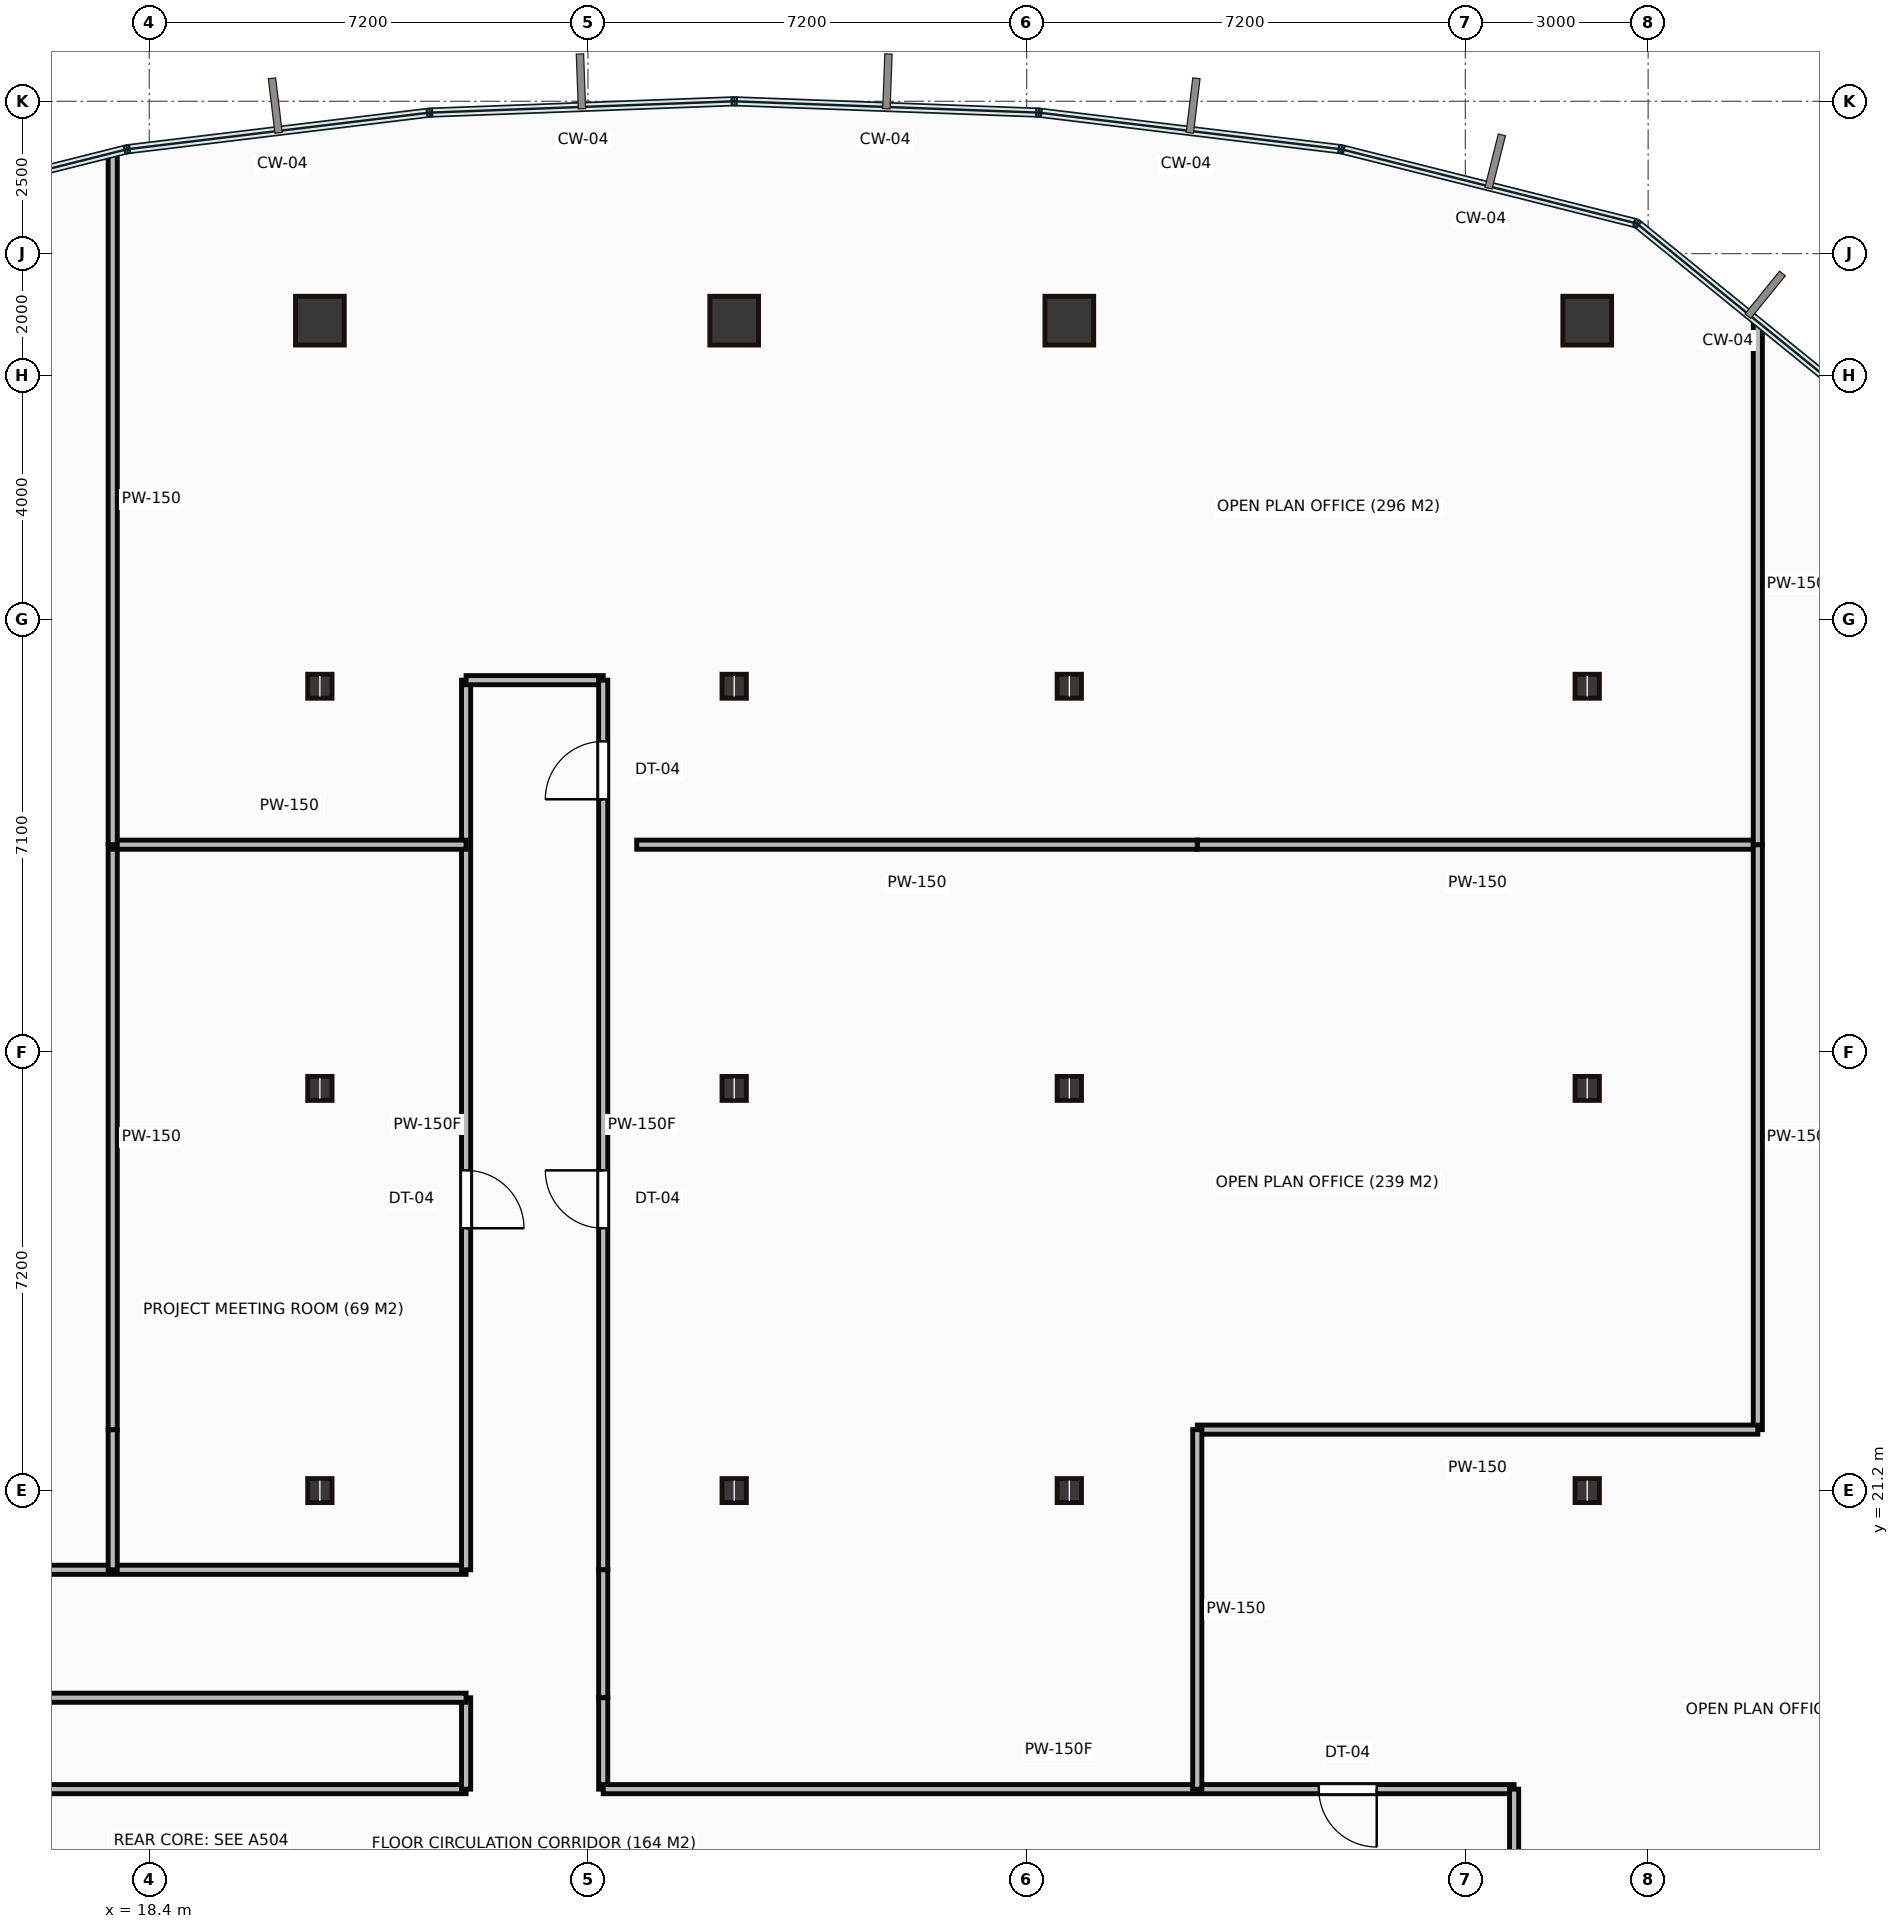
"""IFC4 building model, lengths in metres.
Left out: names, types, materials, properties, quantities, classifications, styles, units other than length and angle.
Written with IfcOpenShell. Run it as: python <this file> out.ifc"""

import sys

from ifc_helpers import new_model, si_unit, direction, frame, frame_2d, origin, origin_2d, place, context, subcontext, project, spatial, rectangle, hollow_rectangle, i_section, extrude, source, transform, mapped, element, fill, save


model = new_model("IFC4")
c1 = context("Model", 3, precision=1e-05, world=origin(), true_north=direction((0.0, 1.0)))
c2 = subcontext(c1, "Body", "Model", "MODEL_VIEW")
j1 = project(units=[si_unit("LENGTHUNIT", "METRE"), si_unit("PLANEANGLEUNIT", "RADIAN")], contexts=[c1])
p1 = place(None, origin())
s1 = spatial("IfcSite", under=j1, at=p1, CompositionType="ELEMENT")
p2 = place(p1, origin())
s2 = spatial("IfcBuilding", under=s1, at=p2, CompositionType="ELEMENT")
p3 = place(p2, frame((0.0, 0.0, 95.95)))
s3 = spatial("IfcBuildingStorey", under=s2, at=p3, CompositionType="ELEMENT", Elevation=95.95)
m1 = source(origin(), c2, "Body", "SweptSolid", [
    extrude(i_section(OverallWidth=0.399, OverallDepth=0.393, WebThickness=0.023, FlangeThickness=0.037, at=origin_2d()), origin(), (0.0, 0.0, 1.0), 3.65),
])
for number, where, z_axis, x_axis in (
    (1, (21.2, 21.2, 0.0), (0.0, 0.0, 1.0), (1.0, 0.0, 0.0)),
    (2, (21.2, 27.8, 0.0), (0.0, 0.0, 1.0), (1.0, 0.0, 0.0)),
    (3, (21.2, 34.4, 0.0), (0.0, 0.0, 1.0), (1.0, 0.0, 0.0)),
):
    element("IfcColumn", number, at=place(p3, frame(where, z_axis=z_axis, x_axis=x_axis)), inside=s3, PredefinedType="COLUMN", context=c2, shape_type="MappedRepresentation", body=[
        mapped(m1, transform((0.0, 0.0, 0.0))),
    ])
m2 = source(origin(), c2, "Body", "SweptSolid", [
    extrude(hollow_rectangle(XDim=0.8, YDim=0.8, WallThickness=0.04, at=origin_2d()), origin(), (0.0, 0.0, 1.0), 3.65),
])
p4 = place(p3, frame((21.2, 40.4, 0.0), z_axis=(0.0, 0.0, 1.0), x_axis=(1.0, 0.0, 0.0)))
e4 = element("IfcColumn", 4, at=p4, inside=s3, PredefinedType="COLUMN", context=c2, shape_type="MappedRepresentation", body=[
    mapped(m2, transform((0.0, 0.0, 0.0))),
])
for number, where, z_axis, x_axis in (
    (5, (28.0, 21.2, 0.0), (0.0, 0.0, 1.0), (1.0, 0.0, 0.0)),
    (6, (28.0, 27.8, 0.0), (0.0, 0.0, 1.0), (1.0, 0.0, 0.0)),
    (7, (28.0, 34.4, 0.0), (0.0, 0.0, 1.0), (1.0, 0.0, 0.0)),
):
    element("IfcColumn", number, at=place(p3, frame(where, z_axis=z_axis, x_axis=x_axis)), inside=s3, PredefinedType="COLUMN", context=c2, shape_type="MappedRepresentation", body=[
        mapped(m1, transform((0.0, 0.0, 0.0))),
    ])
p5 = place(p3, frame((28.0, 40.4, 0.0), z_axis=(0.0, 0.0, 1.0), x_axis=(1.0, 0.0, 0.0)))
e8 = element("IfcColumn", 8, at=p5, inside=s3, PredefinedType="COLUMN", context=c2, shape_type="MappedRepresentation", body=[
    mapped(m2, transform((0.0, 0.0, 0.0))),
])
for number, where, z_axis, x_axis in (
    (9, (33.5, 21.2, 0.0), (0.0, 0.0, 1.0), (1.0, 0.0, 0.0)),
    (10, (33.5, 27.8, 0.0), (0.0, 0.0, 1.0), (1.0, 0.0, 0.0)),
    (11, (33.5, 34.4, 0.0), (0.0, 0.0, 1.0), (1.0, 0.0, 0.0)),
):
    element("IfcColumn", number, at=place(p3, frame(where, z_axis=z_axis, x_axis=x_axis)), inside=s3, PredefinedType="COLUMN", context=c2, shape_type="MappedRepresentation", body=[
        mapped(m1, transform((0.0, 0.0, 0.0))),
    ])
p6 = place(p3, frame((33.5, 40.4, 0.0), z_axis=(0.0, 0.0, 1.0), x_axis=(1.0, 0.0, 0.0)))
e12 = element("IfcColumn", 12, at=p6, inside=s3, PredefinedType="COLUMN", context=c2, shape_type="MappedRepresentation", body=[
    mapped(m2, transform((0.0, 0.0, 0.0))),
])
for number, where, z_axis, x_axis in (
    (13, (42.0, 21.2, 0.0), (0.0, 0.0, 1.0), (1.0, 0.0, 0.0)),
    (14, (42.0, 27.8, 0.0), (0.0, 0.0, 1.0), (1.0, 0.0, 0.0)),
    (15, (42.0, 34.4, 0.0), (0.0, 0.0, 1.0), (1.0, 0.0, 0.0)),
):
    element("IfcColumn", number, at=place(p3, frame(where, z_axis=z_axis, x_axis=x_axis)), inside=s3, PredefinedType="COLUMN", context=c2, shape_type="MappedRepresentation", body=[
        mapped(m1, transform((0.0, 0.0, 0.0))),
    ])
p7 = place(p3, frame((42.0, 40.4, 0.0), z_axis=(0.0, 0.0, 1.0), x_axis=(1.0, 0.0, 0.0)))
e16 = element("IfcColumn", 16, at=p7, inside=s3, PredefinedType="COLUMN", context=c2, shape_type="MappedRepresentation", body=[
    mapped(m2, transform((0.0, 0.0, 0.0))),
])
m3 = source(origin(), c2, "Body", "SweptSolid", [
    extrude(rectangle(XDim=19.0, YDim=0.15, at=frame_2d((9.5, 0.0))), origin(), (0.0, 0.0, 1.0), 3.4),
])
p8 = place(p3, frame((4.6, 16.3, 0.0), z_axis=(0.0, 0.0, 1.0), x_axis=(1.0, 0.0, 0.0)))
e17 = element("IfcWall", 17, at=p8, inside=s3, PredefinedType="PARTITIONING", context=c2, shape_type="MappedRepresentation", body=[
    mapped(m3, transform((0.0, 0.0, 0.0))),
])
p9 = place(p8, frame((9.025, 0.0, 0.0)))
e18 = element("IfcOpeningElement", 18, at=p9, cuts=e17, PredefinedType="OPENING", context=c2, shape_type="SweptSolid", body=[
    extrude(rectangle(XDim=0.95, YDim=2.15, at=frame_2d((0.475, 1.075))), frame((0.0, 0.085, 0.0), z_axis=(0.0, -1.0, 0.0), x_axis=(1.0, 0.0, 0.0)), (0.0, 0.0, 1.0), 0.17),
])
m4 = source(origin(), c2, "Body", "SweptSolid", [
    extrude(rectangle(XDim=1.5, YDim=0.15, at=frame_2d((0.75, 0.0))), origin(), (0.0, 0.0, 1.0), 3.4),
])
p10 = place(p3, frame((23.6, 16.3, 0.0), z_axis=(0.0, 0.0, 1.0), x_axis=(0.0, 1.0, 0.0)))
e19 = element("IfcWall", 19, at=p10, inside=s3, PredefinedType="PARTITIONING", context=c2, shape_type="MappedRepresentation", body=[
    mapped(m4, transform((0.0, 0.0, 0.0))),
])
for number, where, z_axis, x_axis in (
    (20, (23.6, 17.8, 0.0), (0.0, 0.0, 1.0), (-1.0, 0.0, 0.0)),
    (21, (4.6, 19.9, 0.0), (0.0, 0.0, 1.0), (1.0, 0.0, 0.0)),
):
    element("IfcWall", number, at=place(p3, frame(where, z_axis=z_axis, x_axis=x_axis)), inside=s3, PredefinedType="PARTITIONING", context=c2, shape_type="MappedRepresentation", body=[
        mapped(m3, transform((0.0, 0.0, 0.0))),
    ])
m5 = source(origin(), c2, "Body", "SweptSolid", [
    extrude(rectangle(XDim=14.6, YDim=0.15, at=frame_2d((7.3, 0.0))), origin(), (0.0, 0.0, 1.0), 3.4),
])
p11 = place(p3, frame((23.6, 19.9, 0.0), z_axis=(0.0, 0.0, 1.0), x_axis=(0.0, 1.0, 0.0)))
e22 = element("IfcWall", 22, at=p11, inside=s3, PredefinedType="PARTITIONING", context=c2, shape_type="MappedRepresentation", body=[
    mapped(m5, transform((0.0, 0.0, 0.0))),
])
p12 = place(p11, frame((5.605, 0.0, 0.0)))
e23 = element("IfcOpeningElement", 23, at=p12, cuts=e22, PredefinedType="OPENING", context=c2, shape_type="SweptSolid", body=[
    extrude(rectangle(XDim=0.95, YDim=2.15, at=frame_2d((0.475, 1.075))), frame((0.0, 0.085, 0.0), z_axis=(0.0, -1.0, 0.0), x_axis=(1.0, 0.0, 0.0)), (0.0, 0.0, 1.0), 0.17),
])
m6 = source(origin(), c2, "Body", "SweptSolid", [
    extrude(rectangle(XDim=2.25, YDim=0.15, at=frame_2d((1.125, 0.0))), origin(), (0.0, 0.0, 1.0), 2.702),
])
p13 = place(p3, frame((23.6, 34.5, 0.0), z_axis=(0.0, 0.0, 1.0), x_axis=(1.0, 0.0, 0.0)))
e24 = element("IfcWall", 24, at=p13, inside=s3, PredefinedType="PARTITIONING", context=c2, shape_type="MappedRepresentation", body=[
    mapped(m6, transform((0.0, 0.0, 0.0))),
])
p14 = place(p3, frame((25.85, 34.5, 0.0), z_axis=(0.0, 0.0, 1.0), x_axis=(0.0, -1.0, 0.0)))
e25 = element("IfcWall", 25, at=p14, inside=s3, PredefinedType="PARTITIONING", context=c2, shape_type="MappedRepresentation", body=[
    mapped(m5, transform((0.0, 0.0, 0.0))),
])
p15 = place(p14, frame((1.005, 0.0, 0.0)))
e26 = element("IfcOpeningElement", 26, at=p15, cuts=e25, PredefinedType="OPENING", context=c2, shape_type="SweptSolid", body=[
    extrude(rectangle(XDim=0.95, YDim=2.15, at=frame_2d((0.475, 1.075))), frame((0.0, 0.085, 0.0), z_axis=(0.0, -1.0, 0.0), x_axis=(1.0, 0.0, 0.0)), (0.0, 0.0, 1.0), 0.17),
])
p16 = place(p14, frame((8.045, 0.0, 0.0)))
e27 = element("IfcOpeningElement", 27, at=p16, cuts=e25, PredefinedType="OPENING", context=c2, shape_type="SweptSolid", body=[
    extrude(rectangle(XDim=0.95, YDim=2.15, at=frame_2d((0.475, 1.075))), frame((0.0, 0.085, 0.0), z_axis=(0.0, -1.0, 0.0), x_axis=(1.0, 0.0, 0.0)), (0.0, 0.0, 1.0), 0.17),
])
m7 = source(origin(), c2, "Body", "SweptSolid", [
    extrude(rectangle(XDim=2.1, YDim=0.15, at=frame_2d((1.05, 0.0))), origin(), (0.0, 0.0, 1.0), 3.4),
])
p17 = place(p3, frame((25.85, 19.9, 0.0), z_axis=(0.0, 0.0, 1.0), x_axis=(0.0, -1.0, 0.0)))
e28 = element("IfcWall", 28, at=p17, inside=s3, PredefinedType="PARTITIONING", context=c2, shape_type="MappedRepresentation", body=[
    mapped(m7, transform((0.0, 0.0, 0.0))),
])
p18 = place(p3, frame((25.85, 17.8, 0.0), z_axis=(0.0, 0.0, 1.0), x_axis=(0.0, -1.0, 0.0)))
e29 = element("IfcWall", 29, at=p18, inside=s3, PredefinedType="PARTITIONING", context=c2, shape_type="MappedRepresentation", body=[
    mapped(m4, transform((0.0, 0.0, 0.0))),
])
m8 = source(origin(), c2, "Body", "SweptSolid", [
    extrude(rectangle(XDim=14.95, YDim=0.15, at=frame_2d((7.475, 0.0))), origin(), (0.0, 0.0, 1.0), 3.4),
])
p19 = place(p3, frame((25.85, 16.3, 0.0), z_axis=(0.0, 0.0, 1.0), x_axis=(1.0, 0.0, 0.0)))
e30 = element("IfcWall", 30, at=p19, inside=s3, PredefinedType="PARTITIONING", context=c2, shape_type="MappedRepresentation", body=[
    mapped(m8, transform((0.0, 0.0, 0.0))),
])
p20 = place(p19, frame((11.745, 0.0, 0.0)))
e31 = element("IfcOpeningElement", 31, at=p20, cuts=e30, PredefinedType="OPENING", context=c2, shape_type="SweptSolid", body=[
    extrude(rectangle(XDim=0.95, YDim=2.15, at=frame_2d((0.475, 1.075))), frame((0.0, 0.085, 0.0), z_axis=(0.0, -1.0, 0.0), x_axis=(1.0, 0.0, 0.0)), (0.0, 0.0, 1.0), 0.17),
])
m9 = source(origin(), c2, "Body", "SweptSolid", [
    extrude(rectangle(XDim=2.3, YDim=0.15, at=frame_2d((1.15, 0.0))), origin(), (0.0, 0.0, 1.0), 3.4),
])
p21 = place(p3, frame((40.8, 16.3, 0.0), z_axis=(0.0, 0.0, 1.0), x_axis=(0.0, -1.0, 0.0)))
e32 = element("IfcWall", 32, at=p21, inside=s3, PredefinedType="PARTITIONING", context=c2, shape_type="MappedRepresentation", body=[
    mapped(m9, transform((0.0, 0.0, 0.0))),
])
m10 = source(origin(), c2, "Body", "SweptSolid", [
    extrude(rectangle(XDim=9.6, YDim=0.15, at=frame_2d((4.8, 0.0))), origin(), (0.0, 0.0, 1.0), 3.4),
])
p22 = place(p3, frame((17.8, 31.8, 0.0), z_axis=(0.0, 0.0, 1.0), x_axis=(0.0, -1.0, 0.0)))
e33 = element("IfcWall", 33, at=p22, inside=s3, PredefinedType="PARTITIONING", context=c2, shape_type="MappedRepresentation", body=[
    mapped(m10, transform((0.0, 0.0, 0.0))),
])
p23 = place(p3, frame((17.8, 22.2, 0.0), z_axis=(0.0, 0.0, 1.0), x_axis=(0.0, -1.0, 0.0)))
e34 = element("IfcWall", 34, at=p23, inside=s3, PredefinedType="PARTITIONING", context=c2, shape_type="MappedRepresentation", body=[
    mapped(m9, transform((0.0, 0.0, 0.0))),
])
m11 = source(origin(), c2, "Body", "SweptSolid", [
    extrude(rectangle(XDim=5.8, YDim=0.15, at=frame_2d((2.9, 0.0))), origin(), (0.0, 0.0, 1.0), 3.4),
])
p24 = place(p3, frame((17.8, 31.8, 0.0), z_axis=(0.0, 0.0, 1.0), x_axis=(1.0, 0.0, 0.0)))
e35 = element("IfcWall", 35, at=p24, inside=s3, PredefinedType="PARTITIONING", context=c2, shape_type="MappedRepresentation", body=[
    mapped(m11, transform((0.0, 0.0, 0.0))),
])
m12 = source(origin(), c2, "Body", "SweptSolid", [
    extrude(rectangle(XDim=11.333, YDim=0.15, at=frame_2d((5.667, 0.0))), origin(), (0.0, 0.0, 1.0), 3.4),
])
p25 = place(p3, frame((17.8, 43.133, 0.0), z_axis=(0.0, 0.0, 1.0), x_axis=(0.0, -1.0, 0.0)))
e36 = element("IfcWall", 36, at=p25, inside=s3, PredefinedType="PARTITIONING", context=c2, shape_type="MappedRepresentation", body=[
    mapped(m12, transform((0.0, 0.0, 0.0))),
])
m13 = source(origin(), c2, "Body", "SweptSolid", [
    extrude(rectangle(XDim=9.2, YDim=0.15, at=frame_2d((4.6, 0.0))), origin(), (0.0, 0.0, 1.0), 3.4),
])
p26 = place(p3, frame((44.8, 31.8, 0.0), z_axis=(0.0, 0.0, 1.0), x_axis=(-1.0, 0.0, 0.0)))
e37 = element("IfcWall", 37, at=p26, inside=s3, PredefinedType="PARTITIONING", context=c2, shape_type="MappedRepresentation", body=[
    mapped(m13, transform((0.0, 0.0, 0.0))),
])
m14 = source(origin(), c2, "Body", "SweptSolid", [
    extrude(rectangle(XDim=9.2, YDim=0.15, at=frame_2d((4.6, 0.0))), origin(), (0.0, 0.0, 1.0), 3.4),
])
p27 = place(p3, frame((35.6, 31.8, 0.0), z_axis=(0.0, 0.0, 1.0), x_axis=(-1.0, 0.0, 0.0)))
e38 = element("IfcWall", 38, at=p27, inside=s3, PredefinedType="PARTITIONING", context=c2, shape_type="MappedRepresentation", body=[
    mapped(m14, transform((0.0, 0.0, 0.0))),
])
p28 = place(p3, frame((44.8, 31.8, 0.0), z_axis=(0.0, 0.0, 1.0), x_axis=(0.0, -1.0, 0.0)))
e39 = element("IfcWall", 39, at=p28, inside=s3, PredefinedType="PARTITIONING", context=c2, shape_type="MappedRepresentation", body=[
    mapped(m10, transform((0.0, 0.0, 0.0))),
])
p29 = place(p3, frame((44.8, 22.2, 0.0), z_axis=(0.0, 0.0, 1.0), x_axis=(-1.0, 0.0, 0.0)))
e40 = element("IfcWall", 40, at=p29, inside=s3, PredefinedType="PARTITIONING", context=c2, shape_type="MappedRepresentation", body=[
    mapped(m13, transform((0.0, 0.0, 0.0))),
])
m15 = source(origin(), c2, "Body", "SweptSolid", [
    extrude(rectangle(XDim=5.9, YDim=0.15, at=frame_2d((2.95, 0.0))), origin(), (0.0, 0.0, 1.0), 3.4),
])
p30 = place(p3, frame((35.6, 22.2, 0.0), z_axis=(0.0, 0.0, 1.0), x_axis=(0.0, -1.0, 0.0)))
e41 = element("IfcWall", 41, at=p30, inside=s3, PredefinedType="PARTITIONING", context=c2, shape_type="MappedRepresentation", body=[
    mapped(m15, transform((0.0, 0.0, 0.0))),
])
m16 = source(origin(), c2, "Body", "SweptSolid", [
    extrude(rectangle(XDim=8.555, YDim=0.15, at=frame_2d((4.277, 0.0))), origin(), (0.0, 0.0, 1.0), 3.4),
])
p31 = place(p3, frame((44.8, 40.355, 0.0), z_axis=(0.0, 0.0, 1.0), x_axis=(0.0, -1.0, 0.0)))
e42 = element("IfcWall", 42, at=p31, inside=s3, PredefinedType="PARTITIONING", context=c2, shape_type="MappedRepresentation", body=[
    mapped(m16, transform((0.0, 0.0, 0.0))),
])
m17 = source(origin(), c2, "Body", "SweptSolid", [
    extrude(rectangle(XDim=0.95, YDim=2.15, at=frame_2d((0.475, 1.075))), frame((0.0, 0.025, 0.0), z_axis=(0.0, -1.0, 0.0), x_axis=(1.0, 0.0, 0.0)), (0.0, 0.0, 1.0), 0.05),
])
p32 = place(p12, origin())
e43 = element("IfcDoor", 43, at=p32, inside=s3, OperationType="SINGLE_SWING_LEFT", PredefinedType="DOOR", context=c2, shape_type="MappedRepresentation", body=[
    mapped(m17, transform((0.0, 0.0, 0.0))),
])
fill(e23, e43)
p33 = place(p15, origin())
e44 = element("IfcDoor", 44, at=p33, inside=s3, OperationType="SINGLE_SWING_RIGHT", PredefinedType="DOOR", context=c2, shape_type="MappedRepresentation", body=[
    mapped(m17, transform((0.0, 0.0, 0.0))),
])
fill(e26, e44)
p34 = place(p16, origin())
e45 = element("IfcDoor", 45, at=p34, inside=s3, OperationType="SINGLE_SWING_LEFT", PredefinedType="DOOR", context=c2, shape_type="MappedRepresentation", body=[
    mapped(m17, transform((0.0, 0.0, 0.0))),
])
fill(e27, e45)
p35 = place(p20, origin())
e46 = element("IfcDoor", 46, at=p35, inside=s3, OperationType="SINGLE_SWING_RIGHT", PredefinedType="DOOR", context=c2, shape_type="MappedRepresentation", body=[
    mapped(m17, transform((0.0, 0.0, 0.0))),
])
fill(e31, e46)
save(model, sys.argv[1])
